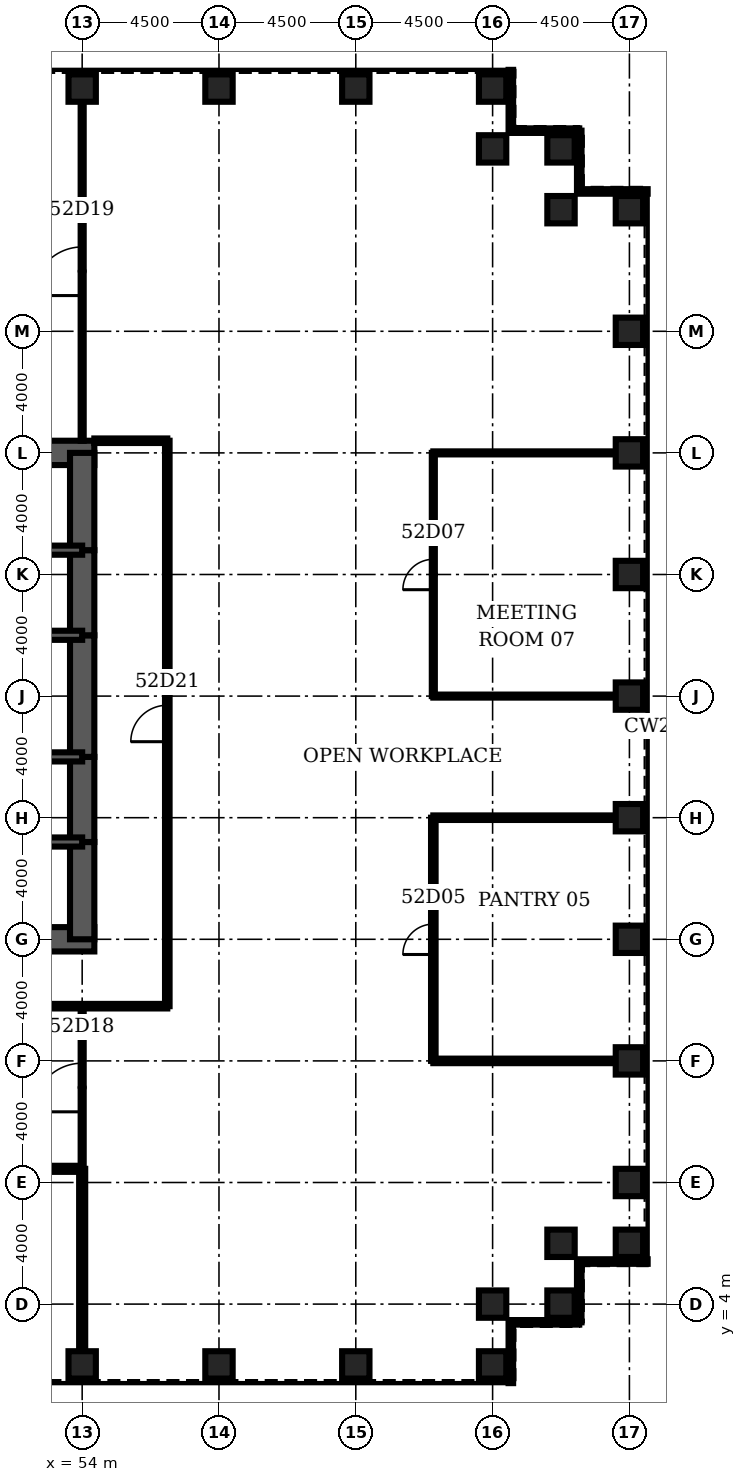
"""IFC4 building model, lengths in metres.
Left out: names, types, materials, properties, quantities, classifications, styles, units other than length and angle.
Written with IfcOpenShell. Run it as: python <this file> out.ifc"""

import sys

from ifc_helpers import new_model, si_unit, direction, frame, frame_2d, origin, origin_2d, place, context, subcontext, project, spatial, rectangle, hollow_rectangle, extrude, element, fill, save


model = new_model("IFC4")
c1 = context("Model", 3, precision=1e-05, world=origin(), true_north=direction((0.0, 1.0)))
c2 = subcontext(c1, "Body", "Model", "MODEL_VIEW")
j1 = project(units=[si_unit("LENGTHUNIT", "METRE"), si_unit("PLANEANGLEUNIT", "RADIAN")], contexts=[c1])
p1 = place(None, origin())
s1 = spatial("IfcSite", under=j1, at=p1, CompositionType="ELEMENT")
p2 = place(p1, origin())
s2 = spatial("IfcBuilding", under=s1, at=p2, CompositionType="ELEMENT")
p3 = place(p2, frame((0.0, 0.0, 232.0)))
s3 = spatial("IfcBuildingStorey", under=s2, at=p3, CompositionType="ELEMENT", Elevation=232.0)
for number, where, z_axis, x_axis in (
    (1, (54.0, 2.0, 0.0), (0.0, 0.0, 1.0), (0.0, 1.0, 0.0)),
    (2, (58.5, 2.0, 0.0), (0.0, 0.0, 1.0), (0.0, 1.0, 0.0)),
    (3, (63.0, 2.0, 0.0), (0.0, 0.0, 1.0), (0.0, 1.0, 0.0)),
    (4, (67.5, 2.0, 0.0), (0.0, 0.0, 1.0), (0.0, 1.0, 0.0)),
    (5, (67.5, 4.0, 0.0), (0.0, 0.0, 1.0), (0.0, 1.0, 0.0)),
    (6, (69.75, 4.0, 0.0), (0.0, 0.0, 1.0), (1.0, 0.0, 0.0)),
    (7, (69.75, 6.0, 0.0), (0.0, 0.0, 1.0), (1.0, 0.0, 0.0)),
    (8, (72.0, 6.0, 0.0), (0.0, 0.0, 1.0), (1.0, 0.0, 0.0)),
    (9, (72.0, 8.0, 0.0), (0.0, 0.0, 1.0), (1.0, 0.0, 0.0)),
    (10, (72.0, 12.0, 0.0), (0.0, 0.0, 1.0), (1.0, 0.0, 0.0)),
    (11, (72.0, 16.0, 0.0), (0.0, 0.0, 1.0), (1.0, 0.0, 0.0)),
    (12, (72.0, 20.0, 0.0), (0.0, 0.0, 1.0), (1.0, 0.0, 0.0)),
    (13, (72.0, 24.0, 0.0), (0.0, 0.0, 1.0), (1.0, 0.0, 0.0)),
    (14, (72.0, 28.0, 0.0), (0.0, 0.0, 1.0), (1.0, 0.0, 0.0)),
    (15, (72.0, 32.0, 0.0), (0.0, 0.0, 1.0), (1.0, 0.0, 0.0)),
    (16, (72.0, 36.0, 0.0), (0.0, 0.0, 1.0), (1.0, 0.0, 0.0)),
    (17, (72.0, 40.0, 0.0), (0.0, 0.0, 1.0), (1.0, 0.0, 0.0)),
    (18, (69.75, 40.0, 0.0), (0.0, 0.0, 1.0), (1.0, 0.0, 0.0)),
    (19, (69.75, 42.0, 0.0), (0.0, 0.0, 1.0), (1.0, 0.0, 0.0)),
    (20, (67.5, 42.0, 0.0), (0.0, 0.0, 1.0), (0.0, 1.0, 0.0)),
    (21, (67.5, 44.0, 0.0), (0.0, 0.0, 1.0), (0.0, 1.0, 0.0)),
    (22, (63.0, 44.0, 0.0), (0.0, 0.0, 1.0), (0.0, 1.0, 0.0)),
    (23, (58.5, 44.0, 0.0), (0.0, 0.0, 1.0), (0.0, 1.0, 0.0)),
    (24, (54.0, 44.0, 0.0), (0.0, 0.0, 1.0), (0.0, 1.0, 0.0)),
):
    element("IfcColumn", number, at=place(p3, frame(where, z_axis=z_axis, x_axis=x_axis)), inside=s3, PredefinedType="COLUMN", context=c2, shape_type="SweptSolid", body=[
        extrude(hollow_rectangle(XDim=0.9, YDim=0.9, WallThickness=0.08, at=origin_2d()), origin(), (0.0, 0.0, 1.0), 4.2),
    ])
for number, where, z_axis, x_axis in (
    (25, (45.0, 16.0, 0.0), (0.0, 0.0, 1.0), (1.0, 0.0, 0.0)),
    (26, (54.4, 32.0, 0.0), (0.0, 0.0, 1.0), (-1.0, 0.0, 0.0)),
):
    element("IfcWall", number, at=place(p3, frame(where, z_axis=z_axis, x_axis=x_axis)), inside=s3, PredefinedType="SHEAR", context=c2, shape_type="SweptSolid", body=[
        extrude(rectangle(XDim=9.4, YDim=0.8, at=frame_2d((4.7, 0.0))), origin(), (0.0, 0.0, 1.0), 4.2),
    ])
p4 = place(p3, frame((54.0, 16.0, 0.0), z_axis=(0.0, 0.0, 1.0), x_axis=(0.0, 1.0, 0.0)))
e27 = element("IfcWall", 27, at=p4, inside=s3, PredefinedType="SHEAR", context=c2, shape_type="SweptSolid", body=[
    extrude(rectangle(XDim=3.2, YDim=0.8, at=frame_2d((1.6, 0.0))), origin(), (0.0, 0.0, 1.0), 4.2),
])
p5 = place(p3, frame((54.0, 19.2, 0.0), z_axis=(0.0, 0.0, 1.0), x_axis=(0.0, 1.0, 0.0)))
e28 = element("IfcWall", 28, at=p5, inside=s3, PredefinedType="SHEAR", context=c2, shape_type="SweptSolid", body=[
    extrude(rectangle(XDim=2.8, YDim=0.8, at=frame_2d((1.4, 0.0))), origin(), (0.0, 0.0, 1.0), 4.2),
])
p6 = place(p5, frame((0.4, 0.0, 0.0)))
e29 = element("IfcOpeningElement", 29, at=p6, cuts=e28, PredefinedType="OPENING", context=c2, shape_type="SweptSolid", body=[
    extrude(rectangle(XDim=1.8, YDim=2.1, at=frame_2d((0.9, 1.05))), frame((0.0, 0.41, 0.0), z_axis=(0.0, -1.0, 0.0), x_axis=(1.0, 0.0, 0.0)), (0.0, 0.0, 1.0), 0.82),
])
p7 = place(p3, frame((54.0, 22.0, 0.0), z_axis=(0.0, 0.0, 1.0), x_axis=(0.0, 1.0, 0.0)))
e30 = element("IfcWall", 30, at=p7, inside=s3, PredefinedType="SHEAR", context=c2, shape_type="SweptSolid", body=[
    extrude(rectangle(XDim=4.0, YDim=0.8, at=frame_2d((2.0, 0.0))), origin(), (0.0, 0.0, 1.0), 4.2),
])
p8 = place(p3, frame((54.0, 26.0, 0.0), z_axis=(0.0, 0.0, 1.0), x_axis=(0.0, 1.0, 0.0)))
e31 = element("IfcWall", 31, at=p8, inside=s3, PredefinedType="SHEAR", context=c2, shape_type="SweptSolid", body=[
    extrude(rectangle(XDim=2.8, YDim=0.8, at=frame_2d((1.4, 0.0))), origin(), (0.0, 0.0, 1.0), 4.2),
])
p9 = place(p8, frame((0.6, 0.0, 0.0)))
e32 = element("IfcOpeningElement", 32, at=p9, cuts=e31, PredefinedType="OPENING", context=c2, shape_type="SweptSolid", body=[
    extrude(rectangle(XDim=1.8, YDim=2.1, at=frame_2d((0.9, 1.05))), frame((0.0, 0.41, 0.0), z_axis=(0.0, -1.0, 0.0), x_axis=(1.0, 0.0, 0.0)), (0.0, 0.0, 1.0), 0.82),
])
p10 = place(p3, frame((54.0, 28.8, 0.0), z_axis=(0.0, 0.0, 1.0), x_axis=(0.0, 1.0, 0.0)))
e33 = element("IfcWall", 33, at=p10, inside=s3, PredefinedType="SHEAR", context=c2, shape_type="SweptSolid", body=[
    extrude(rectangle(XDim=3.2, YDim=0.8, at=frame_2d((1.6, 0.0))), origin(), (0.0, 0.0, 1.0), 4.2),
])
p11 = place(p3, frame((45.0, 19.2, 0.0), z_axis=(0.0, 0.0, 1.0), x_axis=(1.0, 0.0, 0.0)))
e34 = element("IfcWall", 34, at=p11, inside=s3, PredefinedType="SOLIDWALL", context=c2, shape_type="SweptSolid", body=[
    extrude(rectangle(XDim=9.0, YDim=0.3, at=frame_2d((4.5, 0.0))), origin(), (0.0, 0.0, 1.0), 4.2),
])
p12 = place(p11, frame((7.35, 0.0, 0.0)))
e35 = element("IfcOpeningElement", 35, at=p12, cuts=e34, PredefinedType="OPENING", context=c2, shape_type="SweptSolid", body=[
    extrude(rectangle(XDim=1.0, YDim=2.1, at=frame_2d((0.5, 1.05))), frame((0.0, 0.16, 0.0), z_axis=(0.0, -1.0, 0.0), x_axis=(1.0, 0.0, 0.0)), (0.0, 0.0, 1.0), 0.32),
])
p13 = place(p3, frame((45.0, 28.8, 0.0), z_axis=(0.0, 0.0, 1.0), x_axis=(1.0, 0.0, 0.0)))
e36 = element("IfcWall", 36, at=p13, inside=s3, PredefinedType="SOLIDWALL", context=c2, shape_type="SweptSolid", body=[
    extrude(rectangle(XDim=9.0, YDim=0.3, at=frame_2d((4.5, 0.0))), origin(), (0.0, 0.0, 1.0), 4.2),
])
p14 = place(p13, frame((7.35, 0.0, 0.0)))
e37 = element("IfcOpeningElement", 37, at=p14, cuts=e36, PredefinedType="OPENING", context=c2, shape_type="SweptSolid", body=[
    extrude(rectangle(XDim=1.0, YDim=2.1, at=frame_2d((0.5, 1.05))), frame((0.0, 0.16, 0.0), z_axis=(0.0, -1.0, 0.0), x_axis=(1.0, 0.0, 0.0)), (0.0, 0.0, 1.0), 0.32),
])
p15 = place(p3, frame((48.0, 22.0, 0.0), z_axis=(0.0, 0.0, 1.0), x_axis=(1.0, 0.0, 0.0)))
e38 = element("IfcWall", 38, at=p15, inside=s3, PredefinedType="SOLIDWALL", context=c2, shape_type="SweptSolid", body=[
    extrude(rectangle(XDim=6.0, YDim=0.3, at=frame_2d((3.0, 0.0))), origin(), (0.0, 0.0, 1.0), 4.2),
])
p16 = place(p15, frame((2.0, 0.0, 0.0)))
e39 = element("IfcOpeningElement", 39, at=p16, cuts=e38, PredefinedType="OPENING", context=c2, shape_type="SweptSolid", body=[
    extrude(rectangle(XDim=1.0, YDim=2.1, at=frame_2d((0.5, 1.05))), frame((0.0, 0.16, 0.0), z_axis=(0.0, -1.0, 0.0), x_axis=(1.0, 0.0, 0.0)), (0.0, 0.0, 1.0), 0.32),
])
p17 = place(p15, frame((4.2, 0.0, 0.0)))
e40 = element("IfcOpeningElement", 40, at=p17, cuts=e38, PredefinedType="OPENING", context=c2, shape_type="SweptSolid", body=[
    extrude(rectangle(XDim=1.0, YDim=2.1, at=frame_2d((0.5, 1.05))), frame((0.0, 0.16, 0.0), z_axis=(0.0, -1.0, 0.0), x_axis=(1.0, 0.0, 0.0)), (0.0, 0.0, 1.0), 0.32),
])
p18 = place(p3, frame((48.0, 26.0, 0.0), z_axis=(0.0, 0.0, 1.0), x_axis=(1.0, 0.0, 0.0)))
e41 = element("IfcWall", 41, at=p18, inside=s3, PredefinedType="SOLIDWALL", context=c2, shape_type="SweptSolid", body=[
    extrude(rectangle(XDim=6.0, YDim=0.3, at=frame_2d((3.0, 0.0))), origin(), (0.0, 0.0, 1.0), 4.2),
])
p19 = place(p3, frame((36.0, 8.45, 0.0), z_axis=(0.0, 0.0, 1.0), x_axis=(1.0, 0.0, 0.0)))
e42 = element("IfcWall", 42, at=p19, inside=s3, PredefinedType="PARTITIONING", context=c2, shape_type="SweptSolid", body=[
    extrude(rectangle(XDim=18.0, YDim=0.2, at=frame_2d((9.0, 0.0))), origin(), (0.0, 0.0, 1.0), 3.0),
])
p20 = place(p19, frame((8.2, 0.0, 0.0)))
e43 = element("IfcOpeningElement", 43, at=p20, cuts=e42, PredefinedType="OPENING", context=c2, shape_type="SweptSolid", body=[
    extrude(rectangle(XDim=1.6, YDim=2.1, at=frame_2d((0.8, 1.05))), frame((0.0, 0.11, 0.0), z_axis=(0.0, -1.0, 0.0), x_axis=(1.0, 0.0, 0.0)), (0.0, 0.0, 1.0), 0.22),
])
p21 = place(p3, frame((65.55, 12.0, 0.0), z_axis=(0.0, 0.0, 1.0), x_axis=(1.0, 0.0, 0.0)))
e44 = element("IfcWall", 44, at=p21, inside=s3, PredefinedType="PARTITIONING", context=c2, shape_type="SweptSolid", body=[
    extrude(rectangle(XDim=6.0, YDim=0.15, at=frame_2d((3.0, 0.0))), origin(), (0.0, 0.0, 1.0), 3.0),
])
p22 = place(p3, frame((27.0, 13.8, 0.0), z_axis=(0.0, 0.0, 1.0), x_axis=(1.0, 0.0, 0.0)))
e45 = element("IfcWall", 45, at=p22, inside=s3, PredefinedType="PARTITIONING", context=c2, shape_type="SweptSolid", body=[
    extrude(rectangle(XDim=29.8, YDim=0.15, at=frame_2d((14.9, 0.0))), origin(), (0.0, 0.0, 1.0), 3.0),
])
p23 = place(p22, frame((15.925, 0.0, 0.0)))
e46 = element("IfcOpeningElement", 46, at=p23, cuts=e45, PredefinedType="OPENING", context=c2, shape_type="SweptSolid", body=[
    extrude(rectangle(XDim=1.2, YDim=2.1, at=frame_2d((0.6, 1.05))), frame((0.0, 0.085, 0.0), z_axis=(0.0, -1.0, 0.0), x_axis=(1.0, 0.0, 0.0)), (0.0, 0.0, 1.0), 0.17),
])
p24 = place(p3, frame((65.55, 20.0, 0.0), z_axis=(0.0, 0.0, 1.0), x_axis=(1.0, 0.0, 0.0)))
e47 = element("IfcWall", 47, at=p24, inside=s3, PredefinedType="PARTITIONING", context=c2, shape_type="SweptSolid", body=[
    extrude(rectangle(XDim=6.0, YDim=0.15, at=frame_2d((3.0, 0.0))), origin(), (0.0, 0.0, 1.0), 3.0),
])
for number, where, z_axis, x_axis in (
    (48, (65.55, 24.0, 0.0), (0.0, 0.0, 1.0), (1.0, 0.0, 0.0)),
    (49, (65.55, 32.0, 0.0), (0.0, 0.0, 1.0), (1.0, 0.0, 0.0)),
):
    element("IfcWall", number, at=place(p3, frame(where, z_axis=z_axis, x_axis=x_axis)), inside=s3, PredefinedType="PARTITIONING", context=c2, shape_type="SweptSolid", body=[
        extrude(rectangle(XDim=6.0, YDim=0.1, at=frame_2d((3.0, 0.0))), origin(), (0.0, 0.0, 1.0), 3.0),
    ])
p25 = place(p3, frame((54.4, 32.4, 0.0), z_axis=(0.0, 0.0, 1.0), x_axis=(1.0, 0.0, 0.0)))
e50 = element("IfcWall", 50, at=p25, inside=s3, PredefinedType="PARTITIONING", context=c2, shape_type="SweptSolid", body=[
    extrude(rectangle(XDim=2.4, YDim=0.15, at=frame_2d((1.2, 0.0))), origin(), (0.0, 0.0, 1.0), 3.0),
])
p26 = place(p3, frame((54.0, 2.45, 0.0), z_axis=(0.0, 0.0, 1.0), x_axis=(0.0, 1.0, 0.0)))
e51 = element("IfcWall", 51, at=p26, inside=s3, PredefinedType="PARTITIONING", context=c2, shape_type="SweptSolid", body=[
    extrude(rectangle(XDim=6.0, YDim=0.2, at=frame_2d((3.0, 0.0))), origin(), (0.0, 0.0, 1.0), 3.0),
])
p27 = place(p3, frame((54.0, 8.45, 0.0), z_axis=(0.0, 0.0, 1.0), x_axis=(0.0, 1.0, 0.0)))
e52 = element("IfcWall", 52, at=p27, inside=s3, PredefinedType="PARTITIONING", context=c2, shape_type="SweptSolid", body=[
    extrude(rectangle(XDim=5.35, YDim=0.1, at=frame_2d((2.675, 0.0))), origin(), (0.0, 0.0, 1.0), 3.0),
])
p28 = place(p27, frame((1.875, 0.0, 0.0)))
e53 = element("IfcOpeningElement", 53, at=p28, cuts=e52, PredefinedType="OPENING", context=c2, shape_type="SweptSolid", body=[
    extrude(rectangle(XDim=1.6, YDim=2.1, at=frame_2d((0.8, 1.05))), frame((0.0, 0.06, 0.0), z_axis=(0.0, -1.0, 0.0), x_axis=(1.0, 0.0, 0.0)), (0.0, 0.0, 1.0), 0.12),
])
p29 = place(p3, frame((54.0, 32.4, 0.0), z_axis=(0.0, 0.0, 1.0), x_axis=(0.0, 1.0, 0.0)))
e54 = element("IfcWall", 54, at=p29, inside=s3, PredefinedType="PARTITIONING", context=c2, shape_type="SweptSolid", body=[
    extrude(rectangle(XDim=11.15, YDim=0.1, at=frame_2d((5.575, 0.0))), origin(), (0.0, 0.0, 1.0), 3.0),
])
p30 = place(p29, frame((4.775, 0.0, 0.0)))
e55 = element("IfcOpeningElement", 55, at=p30, cuts=e54, PredefinedType="OPENING", context=c2, shape_type="SweptSolid", body=[
    extrude(rectangle(XDim=1.6, YDim=2.1, at=frame_2d((0.8, 1.05))), frame((0.0, 0.06, 0.0), z_axis=(0.0, -1.0, 0.0), x_axis=(1.0, 0.0, 0.0)), (0.0, 0.0, 1.0), 0.12),
])
p31 = place(p3, frame((56.8, 13.8, 0.0), z_axis=(0.0, 0.0, 1.0), x_axis=(0.0, 1.0, 0.0)))
e56 = element("IfcWall", 56, at=p31, inside=s3, PredefinedType="PARTITIONING", context=c2, shape_type="SweptSolid", body=[
    extrude(rectangle(XDim=18.6, YDim=0.15, at=frame_2d((9.3, 0.0))), origin(), (0.0, 0.0, 1.0), 3.0),
])
p32 = place(p31, frame((8.7, 0.0, 0.0)))
e57 = element("IfcOpeningElement", 57, at=p32, cuts=e56, PredefinedType="OPENING", context=c2, shape_type="SweptSolid", body=[
    extrude(rectangle(XDim=1.2, YDim=2.1, at=frame_2d((0.6, 1.05))), frame((0.0, 0.085, 0.0), z_axis=(0.0, -1.0, 0.0), x_axis=(1.0, 0.0, 0.0)), (0.0, 0.0, 1.0), 0.17),
])
p33 = place(p3, frame((65.55, 12.0, 0.0), z_axis=(0.0, 0.0, 1.0), x_axis=(0.0, 1.0, 0.0)))
e58 = element("IfcWall", 58, at=p33, inside=s3, PredefinedType="PARTITIONING", context=c2, shape_type="SweptSolid", body=[
    extrude(rectangle(XDim=8.0, YDim=0.15, at=frame_2d((4.0, 0.0))), origin(), (0.0, 0.0, 1.0), 3.0),
])
p34 = place(p33, frame((3.5, 0.0, 0.0)))
e59 = element("IfcOpeningElement", 59, at=p34, cuts=e58, PredefinedType="OPENING", context=c2, shape_type="SweptSolid", body=[
    extrude(rectangle(XDim=1.0, YDim=2.1, at=frame_2d((0.5, 1.05))), frame((0.0, 0.085, 0.0), z_axis=(0.0, -1.0, 0.0), x_axis=(1.0, 0.0, 0.0)), (0.0, 0.0, 1.0), 0.17),
])
p35 = place(p3, frame((65.55, 24.0, 0.0), z_axis=(0.0, 0.0, 1.0), x_axis=(0.0, 1.0, 0.0)))
e60 = element("IfcWall", 60, at=p35, inside=s3, PredefinedType="PARTITIONING", context=c2, shape_type="SweptSolid", body=[
    extrude(rectangle(XDim=8.0, YDim=0.1, at=frame_2d((4.0, 0.0))), origin(), (0.0, 0.0, 1.0), 3.0),
])
p36 = place(p35, frame((3.5, 0.0, 0.0)))
e61 = element("IfcOpeningElement", 61, at=p36, cuts=e60, PredefinedType="OPENING", context=c2, shape_type="SweptSolid", body=[
    extrude(rectangle(XDim=1.0, YDim=2.1, at=frame_2d((0.5, 1.05))), frame((0.0, 0.06, 0.0), z_axis=(0.0, -1.0, 0.0), x_axis=(1.0, 0.0, 0.0)), (0.0, 0.0, 1.0), 0.12),
])
p37 = place(p3, frame((68.1, 1.4, 0.0), z_axis=(0.0, 0.0, 1.0), x_axis=(0.0, 1.0, 0.0)))
e62 = element("IfcWall", 62, at=p37, inside=s3, PredefinedType="ELEMENTEDWALL", context=c2, shape_type="SweptSolid", body=[
    extrude(rectangle(XDim=2.0, YDim=0.15, at=frame_2d((1.0, 0.0))), origin(), (0.0, 0.0, 1.0), 4.04),
])
p38 = place(p3, frame((68.1, 3.4, 0.0), z_axis=(0.0, 0.0, 1.0), x_axis=(1.0, 0.0, 0.0)))
e63 = element("IfcWall", 63, at=p38, inside=s3, PredefinedType="ELEMENTEDWALL", context=c2, shape_type="SweptSolid", body=[
    extrude(rectangle(XDim=2.25, YDim=0.15, at=frame_2d((1.125, 0.0))), origin(), (0.0, 0.0, 1.0), 4.04),
])
p39 = place(p3, frame((70.35, 3.4, 0.0), z_axis=(0.0, 0.0, 1.0), x_axis=(0.0, 1.0, 0.0)))
e64 = element("IfcWall", 64, at=p39, inside=s3, PredefinedType="ELEMENTEDWALL", context=c2, shape_type="SweptSolid", body=[
    extrude(rectangle(XDim=2.0, YDim=0.15, at=frame_2d((1.0, 0.0))), origin(), (0.0, 0.0, 1.0), 4.04),
])
for number, where, z_axis, x_axis in (
    (65, (70.35, 5.4, 0.0), (0.0, 0.0, 1.0), (1.0, 0.0, 0.0)),
    (66, (72.6, 40.6, 0.0), (0.0, 0.0, 1.0), (-1.0, 0.0, 0.0)),
):
    element("IfcWall", number, at=place(p3, frame(where, z_axis=z_axis, x_axis=x_axis)), inside=s3, PredefinedType="ELEMENTEDWALL", context=c2, shape_type="SweptSolid", body=[
        extrude(rectangle(XDim=2.25, YDim=0.15, at=frame_2d((1.125, 0.0))), origin(), (0.0, 0.0, 1.0), 4.04),
    ])
p40 = place(p3, frame((70.35, 40.6, 0.0), z_axis=(0.0, 0.0, 1.0), x_axis=(0.0, 1.0, 0.0)))
e67 = element("IfcWall", 67, at=p40, inside=s3, PredefinedType="ELEMENTEDWALL", context=c2, shape_type="SweptSolid", body=[
    extrude(rectangle(XDim=2.0, YDim=0.15, at=frame_2d((1.0, 0.0))), origin(), (0.0, 0.0, 1.0), 4.04),
])
p41 = place(p3, frame((70.35, 42.6, 0.0), z_axis=(0.0, 0.0, 1.0), x_axis=(-1.0, 0.0, 0.0)))
e68 = element("IfcWall", 68, at=p41, inside=s3, PredefinedType="ELEMENTEDWALL", context=c2, shape_type="SweptSolid", body=[
    extrude(rectangle(XDim=2.25, YDim=0.15, at=frame_2d((1.125, 0.0))), origin(), (0.0, 0.0, 1.0), 4.04),
])
p42 = place(p3, frame((68.1, 42.6, 0.0), z_axis=(0.0, 0.0, 1.0), x_axis=(0.0, 1.0, 0.0)))
e69 = element("IfcWall", 69, at=p42, inside=s3, PredefinedType="ELEMENTEDWALL", context=c2, shape_type="SweptSolid", body=[
    extrude(rectangle(XDim=2.0, YDim=0.15, at=frame_2d((1.0, 0.0))), origin(), (0.0, 0.0, 1.0), 4.04),
])
p43 = place(p34, origin())
e70 = element("IfcDoor", 70, at=p43, inside=s3, OperationType="SINGLE_SWING_LEFT", PredefinedType="DOOR", context=c2, shape_type="SweptSolid", body=[
    extrude(rectangle(XDim=1.0, YDim=2.1, at=frame_2d((0.5, 1.05))), frame((0.0, 0.025, 0.0), z_axis=(0.0, -1.0, 0.0), x_axis=(1.0, 0.0, 0.0)), (0.0, 0.0, 1.0), 0.05),
])
fill(e59, e70)
p44 = place(p36, origin())
e71 = element("IfcDoor", 71, at=p44, inside=s3, OperationType="SINGLE_SWING_LEFT", PredefinedType="DOOR", context=c2, shape_type="SweptSolid", body=[
    extrude(rectangle(XDim=1.0, YDim=2.1, at=frame_2d((0.5, 1.05))), frame((0.0, 0.025, 0.0), z_axis=(0.0, -1.0, 0.0), x_axis=(1.0, 0.0, 0.0)), (0.0, 0.0, 1.0), 0.05),
])
fill(e61, e71)
p45 = place(p28, origin())
e72 = element("IfcDoor", 72, at=p45, inside=s3, OperationType="SINGLE_SWING_LEFT", PredefinedType="DOOR", context=c2, shape_type="SweptSolid", body=[
    extrude(rectangle(XDim=1.6, YDim=2.1, at=frame_2d((0.8, 1.05))), frame((0.0, 0.025, 0.0), z_axis=(0.0, -1.0, 0.0), x_axis=(1.0, 0.0, 0.0)), (0.0, 0.0, 1.0), 0.05),
])
fill(e53, e72)
p46 = place(p30, origin())
e73 = element("IfcDoor", 73, at=p46, inside=s3, OperationType="SINGLE_SWING_LEFT", PredefinedType="DOOR", context=c2, shape_type="SweptSolid", body=[
    extrude(rectangle(XDim=1.6, YDim=2.1, at=frame_2d((0.8, 1.05))), frame((0.0, 0.025, 0.0), z_axis=(0.0, -1.0, 0.0), x_axis=(1.0, 0.0, 0.0)), (0.0, 0.0, 1.0), 0.05),
])
fill(e55, e73)
p47 = place(p32, origin())
e74 = element("IfcDoor", 74, at=p47, inside=s3, OperationType="SINGLE_SWING_LEFT", PredefinedType="DOOR", context=c2, shape_type="SweptSolid", body=[
    extrude(rectangle(XDim=1.2, YDim=2.1, at=frame_2d((0.6, 1.05))), frame((0.0, 0.025, 0.0), z_axis=(0.0, -1.0, 0.0), x_axis=(1.0, 0.0, 0.0)), (0.0, 0.0, 1.0), 0.05),
])
fill(e57, e74)
p48 = place(p12, origin())
e75 = element("IfcDoor", 75, at=p48, inside=s3, OperationType="SINGLE_SWING_RIGHT", PredefinedType="DOOR", context=c2, shape_type="SweptSolid", body=[
    extrude(rectangle(XDim=1.0, YDim=2.1, at=frame_2d((0.5, 1.05))), frame((0.0, 0.025, 0.0), z_axis=(0.0, -1.0, 0.0), x_axis=(1.0, 0.0, 0.0)), (0.0, 0.0, 1.0), 0.05),
])
fill(e35, e75)
p49 = place(p14, origin())
e76 = element("IfcDoor", 76, at=p49, inside=s3, OperationType="SINGLE_SWING_RIGHT", PredefinedType="DOOR", context=c2, shape_type="SweptSolid", body=[
    extrude(rectangle(XDim=1.0, YDim=2.1, at=frame_2d((0.5, 1.05))), frame((0.0, 0.025, 0.0), z_axis=(0.0, -1.0, 0.0), x_axis=(1.0, 0.0, 0.0)), (0.0, 0.0, 1.0), 0.05),
])
fill(e37, e76)
p50 = place(p6, origin())
e77 = element("IfcDoor", 77, at=p50, inside=s3, OperationType="SINGLE_SWING_LEFT", PredefinedType="DOOR", context=c2, shape_type="SweptSolid", body=[
    extrude(rectangle(XDim=1.8, YDim=2.1, at=frame_2d((0.9, 1.05))), frame((0.0, 0.4, 0.0), z_axis=(0.0, -1.0, 0.0), x_axis=(1.0, 0.0, 0.0)), (0.0, 0.0, 1.0), 0.8),
])
fill(e29, e77)
p51 = place(p9, origin())
e78 = element("IfcDoor", 78, at=p51, inside=s3, OperationType="SINGLE_SWING_LEFT", PredefinedType="DOOR", context=c2, shape_type="SweptSolid", body=[
    extrude(rectangle(XDim=1.8, YDim=2.1, at=frame_2d((0.9, 1.05))), frame((0.0, 0.4, 0.0), z_axis=(0.0, -1.0, 0.0), x_axis=(1.0, 0.0, 0.0)), (0.0, 0.0, 1.0), 0.8),
])
fill(e32, e78)
p52 = place(p17, origin())
e79 = element("IfcDoor", 79, at=p52, inside=s3, OperationType="SINGLE_SWING_RIGHT", PredefinedType="DOOR", context=c2, shape_type="SweptSolid", body=[
    extrude(rectangle(XDim=1.0, YDim=2.1, at=frame_2d((0.5, 1.05))), frame((0.0, 0.025, 0.0), z_axis=(0.0, -1.0, 0.0), x_axis=(1.0, 0.0, 0.0)), (0.0, 0.0, 1.0), 0.05),
])
fill(e40, e79)
save(model, sys.argv[1])
